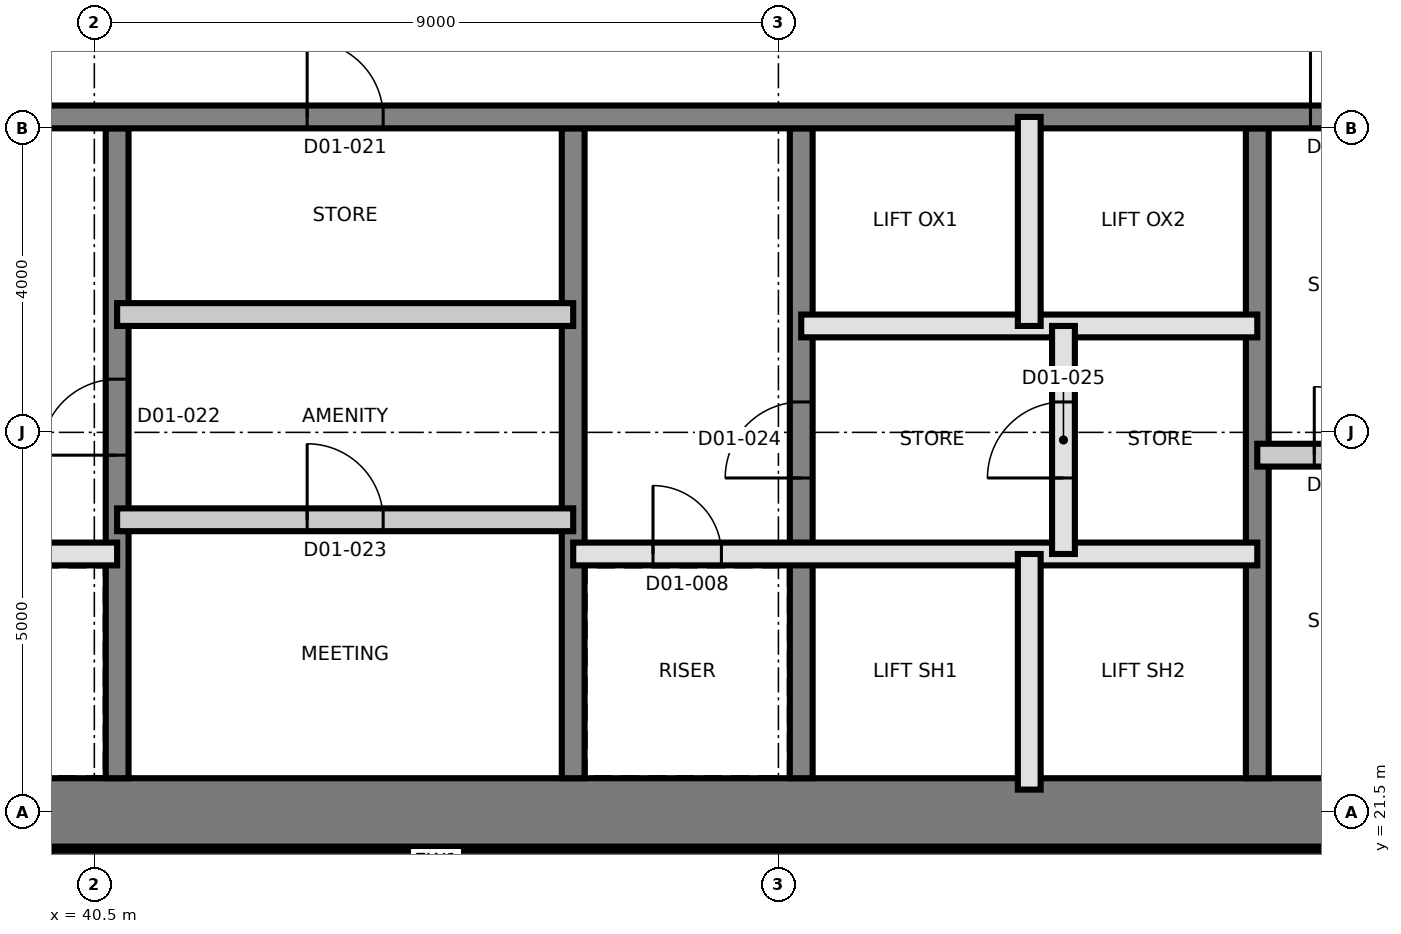
"""IFC4 building model, lengths in metres.
Left out: names, types, materials, properties, quantities, classifications, styles, units other than length and angle.
Written with IfcOpenShell. Run it as: python <this file> out.ifc"""

import sys

from ifc_helpers import new_model, si_unit, direction, frame, frame_2d, origin, place, context, subcontext, project, spatial, rectangle, extrude, element, fill, save


model = new_model("IFC4")
c1 = context("Model", 3, precision=1e-05, world=origin(), true_north=direction((0.0, 1.0)))
c2 = subcontext(c1, "Body", "Model", "MODEL_VIEW")
j1 = project(units=[si_unit("LENGTHUNIT", "METRE"), si_unit("PLANEANGLEUNIT", "RADIAN")], contexts=[c1])
p1 = place(None, origin())
s1 = spatial("IfcSite", under=j1, at=p1, CompositionType="ELEMENT")
p2 = place(p1, origin())
s2 = spatial("IfcBuilding", under=s1, at=p2, CompositionType="ELEMENT")
p3 = place(p2, frame((0.0, 0.0, 40.9)))
s3 = spatial("IfcBuildingStorey", under=s2, at=p3, CompositionType="ELEMENT", Elevation=40.9)
p4 = place(p3, frame((31.05, 21.5, 0.0), z_axis=(0.0, 0.0, 1.0), x_axis=(1.0, 0.0, 0.0)))
e1 = element("IfcWall", 1, at=p4, inside=s3, PredefinedType="SHEAR", context=c2, shape_type="SweptSolid", body=[
    extrude(rectangle(XDim=27.0, YDim=0.9, at=frame_2d((13.5, 0.0))), origin(), (0.0, 0.0, 1.0), 3.7),
])
p5 = place(p3, frame((40.8, 21.95, 0.0), z_axis=(0.0, 0.0, 1.0), x_axis=(0.0, 1.0, 0.0)))
e2 = element("IfcWall", 2, at=p5, inside=s3, PredefinedType="SHEAR", context=c2, shape_type="SweptSolid", body=[
    extrude(rectangle(XDim=8.55, YDim=0.3, at=frame_2d((4.275, 0.0))), origin(), (0.0, 0.0, 1.0), 3.7),
])
p6 = place(p5, frame((4.25, 0.0, 0.0)))
e3 = element("IfcOpeningElement", 3, at=p6, cuts=e2, PredefinedType="OPENING", context=c2, shape_type="SweptSolid", body=[
    extrude(rectangle(XDim=1.0, YDim=2.1, at=frame_2d((0.5, 1.05))), frame((0.0, 0.16, 0.0), z_axis=(0.0, -1.0, 0.0), x_axis=(1.0, 0.0, 0.0)), (0.0, 0.0, 1.0), 0.32),
])
p7 = place(p3, frame((46.8, 21.95, 0.0), z_axis=(0.0, 0.0, 1.0), x_axis=(0.0, 1.0, 0.0)))
e4 = element("IfcWall", 4, at=p7, inside=s3, PredefinedType="SHEAR", context=c2, shape_type="SweptSolid", body=[
    extrude(rectangle(XDim=8.55, YDim=0.3, at=frame_2d((4.275, 0.0))), origin(), (0.0, 0.0, 1.0), 3.7),
])
p8 = place(p3, frame((49.8, 21.95, 0.0), z_axis=(0.0, 0.0, 1.0), x_axis=(0.0, 1.0, 0.0)))
e5 = element("IfcWall", 5, at=p8, inside=s3, PredefinedType="SHEAR", context=c2, shape_type="SweptSolid", body=[
    extrude(rectangle(XDim=8.55, YDim=0.3, at=frame_2d((4.275, 0.0))), origin(), (0.0, 0.0, 1.0), 3.7),
])
p9 = place(p8, frame((3.95, 0.0, 0.0)))
e6 = element("IfcOpeningElement", 6, at=p9, cuts=e5, PredefinedType="OPENING", context=c2, shape_type="SweptSolid", body=[
    extrude(rectangle(XDim=1.0, YDim=2.1, at=frame_2d((0.5, 1.05))), frame((0.0, 0.16, 0.0), z_axis=(0.0, -1.0, 0.0), x_axis=(1.0, 0.0, 0.0)), (0.0, 0.0, 1.0), 0.32),
])
p10 = place(p3, frame((55.8, 21.95, 0.0), z_axis=(0.0, 0.0, 1.0), x_axis=(0.0, 1.0, 0.0)))
e7 = element("IfcWall", 7, at=p10, inside=s3, PredefinedType="SHEAR", context=c2, shape_type="SweptSolid", body=[
    extrude(rectangle(XDim=8.55, YDim=0.3, at=frame_2d((4.275, 0.0))), origin(), (0.0, 0.0, 1.0), 3.7),
])
p11 = place(p3, frame((31.95, 30.65, 0.0), z_axis=(0.0, 0.0, 1.0), x_axis=(1.0, 0.0, 0.0)))
e8 = element("IfcWall", 8, at=p11, inside=s3, PredefinedType="SHEAR", context=c2, shape_type="SweptSolid", body=[
    extrude(rectangle(XDim=26.1, YDim=0.3, at=frame_2d((13.05, 0.0))), origin(), (0.0, 0.0, 1.0), 3.7),
])
p12 = place(p11, frame((24.55, 0.0, 0.0)))
e9 = element("IfcOpeningElement", 9, at=p12, cuts=e8, PredefinedType="OPENING", context=c2, shape_type="SweptSolid", body=[
    extrude(rectangle(XDim=1.0, YDim=2.1, at=frame_2d((0.5, 1.05))), frame((0.0, 0.16, 0.0), z_axis=(0.0, -1.0, 0.0), x_axis=(1.0, 0.0, 0.0)), (0.0, 0.0, 1.0), 0.32),
])
p13 = place(p11, frame((11.35, 0.0, 0.0)))
e10 = element("IfcOpeningElement", 10, at=p13, cuts=e8, PredefinedType="OPENING", context=c2, shape_type="SweptSolid", body=[
    extrude(rectangle(XDim=1.0, YDim=2.1, at=frame_2d((0.5, 1.05))), frame((0.0, 0.16, 0.0), z_axis=(0.0, -1.0, 0.0), x_axis=(1.0, 0.0, 0.0)), (0.0, 0.0, 1.0), 0.32),
])
p14 = place(p3, frame((31.36, 20.85, 0.0), z_axis=(0.0, 0.0, 1.0), x_axis=(1.0, 0.0, 0.0)))
e11 = element("IfcWall", 11, at=p14, inside=s3, PredefinedType="SOLIDWALL", context=c2, shape_type="SweptSolid", body=[
    extrude(rectangle(XDim=27.281, YDim=0.3, at=frame_2d((13.64, 0.0))), origin(), (0.0, 0.0, 1.0), 3.4),
])
p15 = place(p3, frame((31.8, 24.9, 0.0), z_axis=(0.0, 0.0, 1.0), x_axis=(1.0, 0.0, 0.0)))
e12 = element("IfcWall", 12, at=p15, inside=s3, PredefinedType="SOLIDWALL", context=c2, shape_type="SweptSolid", body=[
    extrude(rectangle(XDim=9.0, YDim=0.3, at=frame_2d((4.5, 0.0))), origin(), (0.0, 0.0, 1.0), 3.4),
])
p16 = place(p15, frame((7.05, 0.0, 0.0)))
e13 = element("IfcOpeningElement", 13, at=p16, cuts=e12, PredefinedType="OPENING", context=c2, shape_type="SweptSolid", body=[
    extrude(rectangle(XDim=0.9, YDim=2.1, at=frame_2d((0.45, 1.05))), frame((0.0, 0.16, 0.0), z_axis=(0.0, -1.0, 0.0), x_axis=(1.0, 0.0, 0.0)), (0.0, 0.0, 1.0), 0.32),
])
p17 = place(p15, frame((0.95, 0.0, 0.0)))
e14 = element("IfcOpeningElement", 14, at=p17, cuts=e12, PredefinedType="OPENING", context=c2, shape_type="SweptSolid", body=[
    extrude(rectangle(XDim=1.1, YDim=2.4, at=frame_2d((0.55, 1.2))), frame((0.0, 0.16, 0.0), z_axis=(0.0, -1.0, 0.0), x_axis=(1.0, 0.0, 0.0)), (0.0, 0.0, 1.0), 0.32),
])
p18 = place(p15, frame((3.95, 0.0, 0.0)))
e15 = element("IfcOpeningElement", 15, at=p18, cuts=e12, PredefinedType="OPENING", context=c2, shape_type="SweptSolid", body=[
    extrude(rectangle(XDim=1.1, YDim=2.4, at=frame_2d((0.55, 1.2))), frame((0.0, 0.16, 0.0), z_axis=(0.0, -1.0, 0.0), x_axis=(1.0, 0.0, 0.0)), (0.0, 0.0, 1.0), 0.32),
])
p19 = place(p3, frame((46.8, 24.9, 0.0), z_axis=(0.0, 0.0, 1.0), x_axis=(1.0, 0.0, 0.0)))
e16 = element("IfcWall", 16, at=p19, inside=s3, PredefinedType="SOLIDWALL", context=c2, shape_type="SweptSolid", body=[
    extrude(rectangle(XDim=9.0, YDim=0.3, at=frame_2d((4.5, 0.0))), origin(), (0.0, 0.0, 1.0), 3.4),
])
p20 = place(p19, frame((1.05, 0.0, 0.0)))
e17 = element("IfcOpeningElement", 17, at=p20, cuts=e16, PredefinedType="OPENING", context=c2, shape_type="SweptSolid", body=[
    extrude(rectangle(XDim=0.9, YDim=2.1, at=frame_2d((0.45, 1.05))), frame((0.0, 0.16, 0.0), z_axis=(0.0, -1.0, 0.0), x_axis=(1.0, 0.0, 0.0)), (0.0, 0.0, 1.0), 0.32),
])
p21 = place(p3, frame((40.8, 25.35, 0.0), z_axis=(0.0, 0.0, 1.0), x_axis=(1.0, 0.0, 0.0)))
e18 = element("IfcWall", 18, at=p21, inside=s3, PredefinedType="PARTITIONING", context=c2, shape_type="SweptSolid", body=[
    extrude(rectangle(XDim=6.0, YDim=0.3, at=frame_2d((3.0, 0.0))), origin(), (0.0, 0.0, 1.0), 3.4),
])
p22 = place(p21, frame((2.5, 0.0, 0.0)))
e19 = element("IfcOpeningElement", 19, at=p22, cuts=e18, PredefinedType="OPENING", context=c2, shape_type="SweptSolid", body=[
    extrude(rectangle(XDim=1.0, YDim=2.1, at=frame_2d((0.5, 1.05))), frame((0.0, 0.16, 0.0), z_axis=(0.0, -1.0, 0.0), x_axis=(1.0, 0.0, 0.0)), (0.0, 0.0, 1.0), 0.32),
])
p23 = place(p3, frame((55.8, 26.2, 0.0), z_axis=(0.0, 0.0, 1.0), x_axis=(1.0, 0.0, 0.0)))
e20 = element("IfcWall", 20, at=p23, inside=s3, PredefinedType="PARTITIONING", context=c2, shape_type="SweptSolid", body=[
    extrude(rectangle(XDim=2.4, YDim=0.3, at=frame_2d((1.2, 0.0))), origin(), (0.0, 0.0, 1.0), 3.4),
])
p24 = place(p23, frame((0.75, 0.0, 0.0)))
e21 = element("IfcOpeningElement", 21, at=p24, cuts=e20, PredefinedType="OPENING", context=c2, shape_type="SweptSolid", body=[
    extrude(rectangle(XDim=0.9, YDim=2.1, at=frame_2d((0.45, 1.05))), frame((0.0, 0.16, 0.0), z_axis=(0.0, -1.0, 0.0), x_axis=(1.0, 0.0, 0.0)), (0.0, 0.0, 1.0), 0.32),
])
p25 = place(p3, frame((49.8, 27.9, 0.0), z_axis=(0.0, 0.0, 1.0), x_axis=(1.0, 0.0, 0.0)))
e22 = element("IfcWall", 22, at=p25, inside=s3, PredefinedType="SOLIDWALL", context=c2, shape_type="SweptSolid", body=[
    extrude(rectangle(XDim=6.0, YDim=0.3, at=frame_2d((3.0, 0.0))), origin(), (0.0, 0.0, 1.0), 3.4),
])
p26 = place(p3, frame((40.8, 28.05, 0.0), z_axis=(0.0, 0.0, 1.0), x_axis=(1.0, 0.0, 0.0)))
e23 = element("IfcWall", 23, at=p26, inside=s3, PredefinedType="PARTITIONING", context=c2, shape_type="SweptSolid", body=[
    extrude(rectangle(XDim=6.0, YDim=0.3, at=frame_2d((3.0, 0.0))), origin(), (0.0, 0.0, 1.0), 3.4),
])
p27 = place(p3, frame((52.8, 21.8, 0.0), z_axis=(0.0, 0.0, 1.0), x_axis=(0.0, 1.0, 0.0)))
e24 = element("IfcWall", 24, at=p27, inside=s3, PredefinedType="SOLIDWALL", context=c2, shape_type="SweptSolid", body=[
    extrude(rectangle(XDim=3.1, YDim=0.3, at=frame_2d((1.55, 0.0))), origin(), (0.0, 0.0, 1.0), 3.4),
])
p28 = place(p3, frame((52.8, 27.9, 0.0), z_axis=(0.0, 0.0, 1.0), x_axis=(0.0, 1.0, 0.0)))
e25 = element("IfcWall", 25, at=p28, inside=s3, PredefinedType="SOLIDWALL", context=c2, shape_type="SweptSolid", body=[
    extrude(rectangle(XDim=2.75, YDim=0.3, at=frame_2d((1.375, 0.0))), origin(), (0.0, 0.0, 1.0), 3.4),
])
p29 = place(p3, frame((53.25, 24.9, 0.0), z_axis=(0.0, 0.0, 1.0), x_axis=(0.0, 1.0, 0.0)))
e26 = element("IfcWall", 26, at=p29, inside=s3, PredefinedType="SOLIDWALL", context=c2, shape_type="SweptSolid", body=[
    extrude(rectangle(XDim=3.0, YDim=0.3, at=frame_2d((1.5, 0.0))), origin(), (0.0, 0.0, 1.0), 3.4),
])
p30 = place(p29, frame((1.0, 0.0, 0.0)))
e27 = element("IfcOpeningElement", 27, at=p30, cuts=e26, PredefinedType="OPENING", context=c2, shape_type="SweptSolid", body=[
    extrude(rectangle(XDim=1.0, YDim=2.1, at=frame_2d((0.5, 1.05))), frame((0.0, 0.16, 0.0), z_axis=(0.0, -1.0, 0.0), x_axis=(1.0, 0.0, 0.0)), (0.0, 0.0, 1.0), 0.32),
])
p31 = place(p20, origin())
e28 = element("IfcDoor", 28, at=p31, inside=s3, OperationType="SINGLE_SWING_RIGHT", PredefinedType="DOOR", context=c2, shape_type="SweptSolid", body=[
    extrude(rectangle(XDim=0.9, YDim=2.1, at=frame_2d((0.45, 1.05))), frame((0.0, 0.025, 0.0), z_axis=(0.0, -1.0, 0.0), x_axis=(1.0, 0.0, 0.0)), (0.0, 0.0, 1.0), 0.05),
])
fill(e17, e28)
p32 = place(p12, origin())
e29 = element("IfcDoor", 29, at=p32, inside=s3, OperationType="SINGLE_SWING_LEFT", PredefinedType="DOOR", context=c2, shape_type="SweptSolid", body=[
    extrude(rectangle(XDim=1.0, YDim=2.1, at=frame_2d((0.5, 1.05))), frame((0.0, 0.025, 0.0), z_axis=(0.0, -1.0, 0.0), x_axis=(1.0, 0.0, 0.0)), (0.0, 0.0, 1.0), 0.05),
])
fill(e9, e29)
p33 = place(p24, origin())
e30 = element("IfcDoor", 30, at=p33, inside=s3, OperationType="SINGLE_SWING_RIGHT", PredefinedType="DOOR", context=c2, shape_type="SweptSolid", body=[
    extrude(rectangle(XDim=0.9, YDim=2.1, at=frame_2d((0.45, 1.05))), frame((0.0, 0.025, 0.0), z_axis=(0.0, -1.0, 0.0), x_axis=(1.0, 0.0, 0.0)), (0.0, 0.0, 1.0), 0.05),
])
fill(e21, e30)
p34 = place(p13, origin())
e31 = element("IfcDoor", 31, at=p34, inside=s3, OperationType="SINGLE_SWING_LEFT", PredefinedType="DOOR", context=c2, shape_type="SweptSolid", body=[
    extrude(rectangle(XDim=1.0, YDim=2.1, at=frame_2d((0.5, 1.05))), frame((0.0, 0.025, 0.0), z_axis=(0.0, -1.0, 0.0), x_axis=(1.0, 0.0, 0.0)), (0.0, 0.0, 1.0), 0.05),
])
fill(e10, e31)
p35 = place(p6, origin())
e32 = element("IfcDoor", 32, at=p35, inside=s3, OperationType="SINGLE_SWING_RIGHT", PredefinedType="DOOR", context=c2, shape_type="SweptSolid", body=[
    extrude(rectangle(XDim=1.0, YDim=2.1, at=frame_2d((0.5, 1.05))), frame((0.0, 0.025, 0.0), z_axis=(0.0, -1.0, 0.0), x_axis=(1.0, 0.0, 0.0)), (0.0, 0.0, 1.0), 0.05),
])
fill(e3, e32)
p36 = place(p22, origin())
e33 = element("IfcDoor", 33, at=p36, inside=s3, OperationType="SINGLE_SWING_RIGHT", PredefinedType="DOOR", context=c2, shape_type="SweptSolid", body=[
    extrude(rectangle(XDim=1.0, YDim=2.1, at=frame_2d((0.5, 1.05))), frame((0.0, 0.025, 0.0), z_axis=(0.0, -1.0, 0.0), x_axis=(1.0, 0.0, 0.0)), (0.0, 0.0, 1.0), 0.05),
])
fill(e19, e33)
p37 = place(p9, origin())
e34 = element("IfcDoor", 34, at=p37, inside=s3, OperationType="SINGLE_SWING_RIGHT", PredefinedType="DOOR", context=c2, shape_type="SweptSolid", body=[
    extrude(rectangle(XDim=1.0, YDim=2.1, at=frame_2d((0.5, 1.05))), frame((0.0, 0.025, 0.0), z_axis=(0.0, -1.0, 0.0), x_axis=(1.0, 0.0, 0.0)), (0.0, 0.0, 1.0), 0.05),
])
fill(e6, e34)
p38 = place(p30, origin())
e35 = element("IfcDoor", 35, at=p38, inside=s3, OperationType="SINGLE_SWING_RIGHT", PredefinedType="DOOR", context=c2, shape_type="SweptSolid", body=[
    extrude(rectangle(XDim=1.0, YDim=2.1, at=frame_2d((0.5, 1.05))), frame((0.0, 0.025, 0.0), z_axis=(0.0, -1.0, 0.0), x_axis=(1.0, 0.0, 0.0)), (0.0, 0.0, 1.0), 0.05),
])
fill(e27, e35)
save(model, sys.argv[1])
